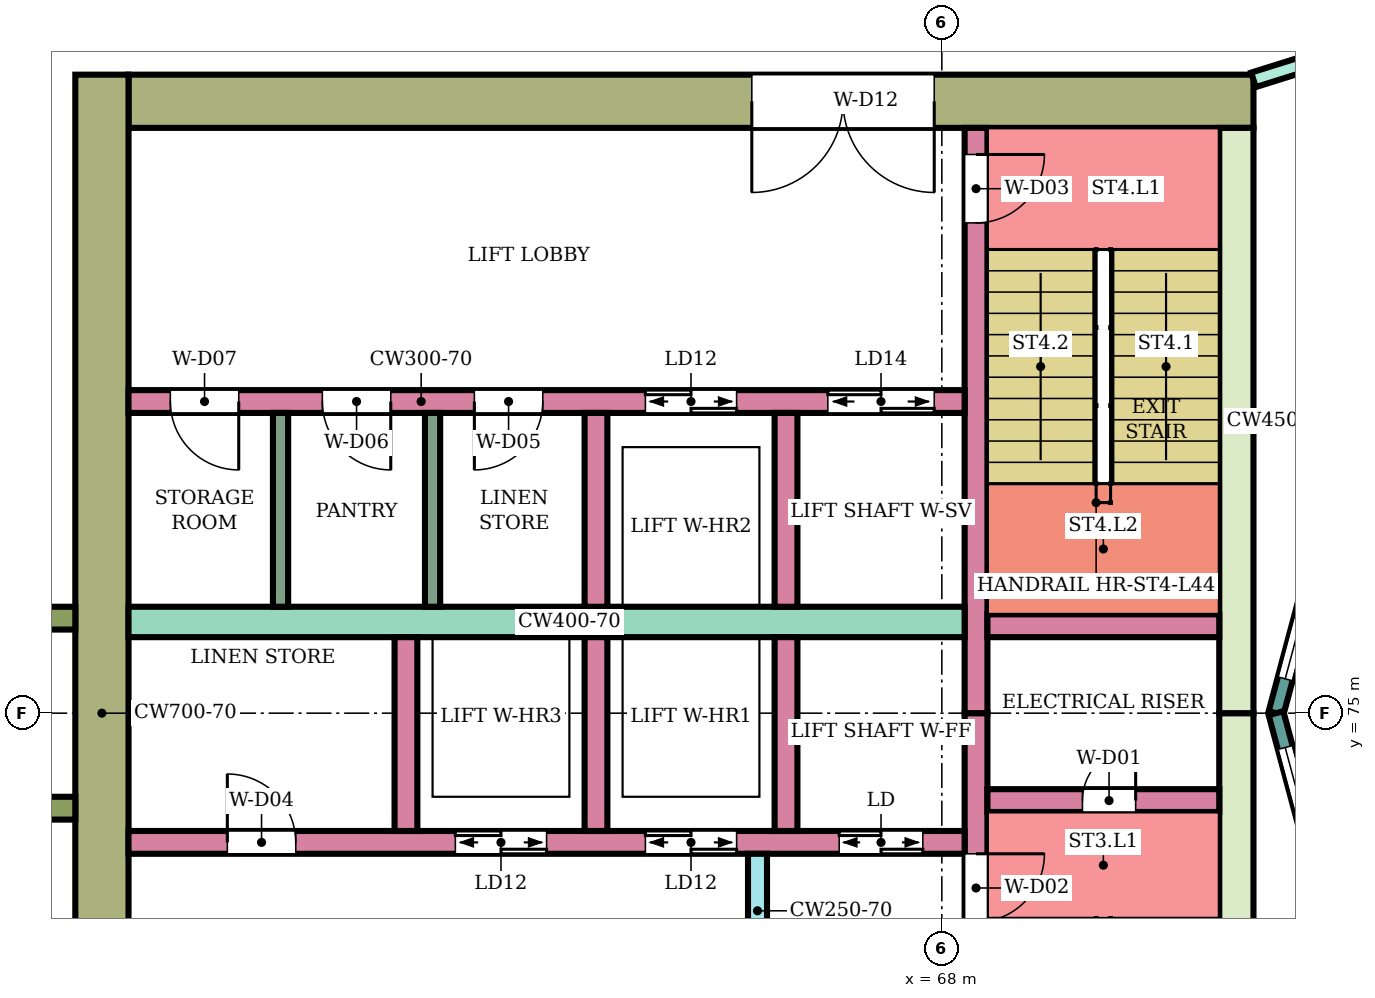
"""IFC4 building model, lengths in metres.
Left out: names, types, materials, properties, quantities, classifications, styles, units other than length and angle.
Written with IfcOpenShell. Run it as: python <this file> out.ifc"""

import sys

from ifc_helpers import new_model, si_unit, direction, frame, frame_2d, origin, place, context, subcontext, project, spatial, rectangle, extrude, element, fill, save


model = new_model("IFC4")
c1 = context("Model", 3, precision=1e-05, world=origin(), true_north=direction((0.0, 1.0)))
c2 = subcontext(c1, "Body", "Model", "MODEL_VIEW")
j1 = project(units=[si_unit("LENGTHUNIT", "METRE"), si_unit("PLANEANGLEUNIT", "RADIAN")], contexts=[c1])
p1 = place(None, origin())
s1 = spatial("IfcSite", under=j1, at=p1, CompositionType="ELEMENT")
p2 = place(p1, origin())
s2 = spatial("IfcBuilding", under=s1, at=p2, CompositionType="ELEMENT")
p3 = place(p2, frame((0.0, 0.0, 190.5)))
s3 = spatial("IfcBuildingStorey", under=s2, at=p3, CompositionType="ELEMENT", Elevation=190.5)
p4 = place(p3, frame((72.1, 83.05, 0.0), z_axis=(0.0, 0.0, 1.0), x_axis=(-1.0, 0.0, 0.0)))
e1 = element("IfcWall", 1, at=p4, inside=s3, PredefinedType="SHEAR", context=c2, shape_type="SweptSolid", body=[
    extrude(rectangle(XDim=14.8, YDim=0.7, at=frame_2d((7.4, 0.0))), origin(), (0.0, 0.0, 1.0), 3.78),
])
p5 = place(p4, frame((4.2, 0.0, 0.0)))
e2 = element("IfcOpeningElement", 2, at=p5, cuts=e1, PredefinedType="OPENING", context=c2, shape_type="SweptSolid", body=[
    extrude(rectangle(XDim=2.4, YDim=2.4, at=frame_2d((1.2, 1.2))), frame((0.0, 0.36, 0.0), z_axis=(0.0, -1.0, 0.0), x_axis=(1.0, 0.0, 0.0)), (0.0, 0.0, 1.0), 0.72),
])
for number, where, z_axis, x_axis in (
    (3, (71.875, 75.0, 0.0), (0.0, 0.0, 1.0), (0.0, -1.0, 0.0)),
    (4, (71.875, 82.7, 0.0), (0.0, 0.0, 1.0), (0.0, -1.0, 0.0)),
):
    element("IfcWall", number, at=place(p3, frame(where, z_axis=z_axis, x_axis=x_axis)), inside=s3, PredefinedType="SHEAR", context=c2, shape_type="SweptSolid", body=[
        extrude(rectangle(XDim=7.7, YDim=0.45, at=frame_2d((3.85, 0.0))), origin(), (0.0, 0.0, 1.0), 3.78),
    ])
p6 = place(p3, frame((56.95, 83.4, 0.0), z_axis=(0.0, 0.0, 1.0), x_axis=(0.0, -1.0, 0.0)))
e5 = element("IfcWall", 5, at=p6, inside=s3, PredefinedType="SHEAR", context=c2, shape_type="SweptSolid", body=[
    extrude(rectangle(XDim=16.8, YDim=0.7, at=frame_2d((8.4, 0.0))), origin(), (0.0, 0.0, 1.0), 3.78),
])
p7 = place(p3, frame((68.45, 75.0, 0.0), z_axis=(0.0, 0.0, 1.0), x_axis=(0.0, -1.0, 0.0)))
e6 = element("IfcWall", 6, at=p7, inside=s3, PredefinedType="SHEAR", context=c2, shape_type="SweptSolid", body=[
    extrude(rectangle(XDim=7.7, YDim=0.3, at=frame_2d((3.85, 0.0))), origin(), (0.0, 0.0, 1.0), 3.78),
])
p8 = place(p7, frame((1.85, 0.0, 0.0)))
e7 = element("IfcOpeningElement", 7, at=p8, cuts=e6, PredefinedType="OPENING", context=c2, shape_type="SweptSolid", body=[
    extrude(rectangle(XDim=0.9, YDim=2.1, at=frame_2d((0.45, 1.05))), frame((0.0, 0.16, 0.0), z_axis=(0.0, -1.0, 0.0), x_axis=(1.0, 0.0, 0.0)), (0.0, 0.0, 1.0), 0.32),
])
p9 = place(p3, frame((68.45, 82.7, 0.0), z_axis=(0.0, 0.0, 1.0), x_axis=(0.0, -1.0, 0.0)))
e8 = element("IfcWall", 8, at=p9, inside=s3, PredefinedType="SHEAR", context=c2, shape_type="SweptSolid", body=[
    extrude(rectangle(XDim=7.7, YDim=0.3, at=frame_2d((3.85, 0.0))), origin(), (0.0, 0.0, 1.0), 3.78),
])
p10 = place(p9, frame((0.35, 0.0, 0.0)))
e9 = element("IfcOpeningElement", 9, at=p10, cuts=e8, PredefinedType="OPENING", context=c2, shape_type="SweptSolid", body=[
    extrude(rectangle(XDim=0.9, YDim=2.1, at=frame_2d((0.45, 1.05))), frame((0.0, 0.16, 0.0), z_axis=(0.0, -1.0, 0.0), x_axis=(1.0, 0.0, 0.0)), (0.0, 0.0, 1.0), 0.32),
])
p11 = place(p3, frame((71.65, 73.85, 0.0), z_axis=(0.0, 0.0, 1.0), x_axis=(-1.0, 0.0, 0.0)))
e10 = element("IfcWall", 10, at=p11, inside=s3, PredefinedType="SHEAR", context=c2, shape_type="SweptSolid", body=[
    extrude(rectangle(XDim=3.05, YDim=0.3, at=frame_2d((1.525, 0.0))), origin(), (0.0, 0.0, 1.0), 3.78),
])
p12 = place(p11, frame((1.1, 0.0, 0.0)))
e11 = element("IfcOpeningElement", 11, at=p12, cuts=e10, PredefinedType="OPENING", context=c2, shape_type="SweptSolid", body=[
    extrude(rectangle(XDim=0.7, YDim=2.0, at=frame_2d((0.35, 1.0))), frame((0.0, 0.16, 0.0), z_axis=(0.0, -1.0, 0.0), x_axis=(1.0, 0.0, 0.0)), (0.0, 0.0, 1.0), 0.32),
])
p13 = place(p3, frame((71.65, 76.15, 0.0), z_axis=(0.0, 0.0, 1.0), x_axis=(-1.0, 0.0, 0.0)))
e12 = element("IfcWall", 12, at=p13, inside=s3, PredefinedType="SHEAR", context=c2, shape_type="SweptSolid", body=[
    extrude(rectangle(XDim=3.05, YDim=0.3, at=frame_2d((1.525, 0.0))), origin(), (0.0, 0.0, 1.0), 3.78),
])
p14 = place(p3, frame((68.3, 73.3, 0.0), z_axis=(0.0, 0.0, 1.0), x_axis=(-1.0, 0.0, 0.0)))
e13 = element("IfcWall", 13, at=p14, inside=s3, PredefinedType="SHEAR", context=c2, shape_type="SweptSolid", body=[
    extrude(rectangle(XDim=11.0, YDim=0.3, at=frame_2d((5.5, 0.0))), origin(), (0.0, 0.0, 1.0), 3.78),
])
p15 = place(p14, frame((0.55, 0.0, 0.0)))
e14 = element("IfcOpeningElement", 14, at=p15, cuts=e13, PredefinedType="OPENING", context=c2, shape_type="SweptSolid", body=[
    extrude(rectangle(XDim=1.1, YDim=2.1, at=frame_2d((0.55, 1.05))), frame((0.0, 0.16, 0.0), z_axis=(0.0, -1.0, 0.0), x_axis=(1.0, 0.0, 0.0)), (0.0, 0.0, 1.0), 0.32),
])
p16 = place(p14, frame((3.0, 0.0, 0.0)))
e15 = element("IfcOpeningElement", 15, at=p16, cuts=e13, PredefinedType="OPENING", context=c2, shape_type="SweptSolid", body=[
    extrude(rectangle(XDim=1.2, YDim=2.1, at=frame_2d((0.6, 1.05))), frame((0.0, 0.16, 0.0), z_axis=(0.0, -1.0, 0.0), x_axis=(1.0, 0.0, 0.0)), (0.0, 0.0, 1.0), 0.32),
])
p17 = place(p14, frame((5.5, 0.0, 0.0)))
e16 = element("IfcOpeningElement", 16, at=p17, cuts=e13, PredefinedType="OPENING", context=c2, shape_type="SweptSolid", body=[
    extrude(rectangle(XDim=1.2, YDim=2.1, at=frame_2d((0.6, 1.05))), frame((0.0, 0.16, 0.0), z_axis=(0.0, -1.0, 0.0), x_axis=(1.0, 0.0, 0.0)), (0.0, 0.0, 1.0), 0.32),
])
p18 = place(p14, frame((8.8, 0.0, 0.0)))
e17 = element("IfcOpeningElement", 17, at=p18, cuts=e13, PredefinedType="OPENING", context=c2, shape_type="SweptSolid", body=[
    extrude(rectangle(XDim=0.9, YDim=2.1, at=frame_2d((0.45, 1.05))), frame((0.0, 0.16, 0.0), z_axis=(0.0, -1.0, 0.0), x_axis=(1.0, 0.0, 0.0)), (0.0, 0.0, 1.0), 0.32),
])
p19 = place(p3, frame((68.3, 76.2, 0.0), z_axis=(0.0, 0.0, 1.0), x_axis=(-1.0, 0.0, 0.0)))
e18 = element("IfcWall", 18, at=p19, inside=s3, PredefinedType="SHEAR", context=c2, shape_type="SweptSolid", body=[
    extrude(rectangle(XDim=11.0, YDim=0.4, at=frame_2d((5.5, 0.0))), origin(), (0.0, 0.0, 1.0), 3.78),
])
p20 = place(p3, frame((68.3, 79.1, 0.0), z_axis=(0.0, 0.0, 1.0), x_axis=(-1.0, 0.0, 0.0)))
e19 = element("IfcWall", 19, at=p20, inside=s3, PredefinedType="SHEAR", context=c2, shape_type="SweptSolid", body=[
    extrude(rectangle(XDim=11.0, YDim=0.3, at=frame_2d((5.5, 0.0))), origin(), (0.0, 0.0, 1.0), 3.78),
])
p21 = place(p20, frame((0.4, 0.0, 0.0)))
e20 = element("IfcOpeningElement", 20, at=p21, cuts=e19, PredefinedType="OPENING", context=c2, shape_type="SweptSolid", body=[
    extrude(rectangle(XDim=1.4, YDim=2.1, at=frame_2d((0.7, 1.05))), frame((0.0, 0.16, 0.0), z_axis=(0.0, -1.0, 0.0), x_axis=(1.0, 0.0, 0.0)), (0.0, 0.0, 1.0), 0.32),
])
p22 = place(p20, frame((3.0, 0.0, 0.0)))
e21 = element("IfcOpeningElement", 21, at=p22, cuts=e19, PredefinedType="OPENING", context=c2, shape_type="SweptSolid", body=[
    extrude(rectangle(XDim=1.2, YDim=2.1, at=frame_2d((0.6, 1.05))), frame((0.0, 0.16, 0.0), z_axis=(0.0, -1.0, 0.0), x_axis=(1.0, 0.0, 0.0)), (0.0, 0.0, 1.0), 0.32),
])
p23 = place(p20, frame((5.55, 0.0, 0.0)))
e22 = element("IfcOpeningElement", 22, at=p23, cuts=e19, PredefinedType="OPENING", context=c2, shape_type="SweptSolid", body=[
    extrude(rectangle(XDim=0.9, YDim=2.1, at=frame_2d((0.45, 1.05))), frame((0.0, 0.16, 0.0), z_axis=(0.0, -1.0, 0.0), x_axis=(1.0, 0.0, 0.0)), (0.0, 0.0, 1.0), 0.32),
])
p24 = place(p20, frame((7.55, 0.0, 0.0)))
e23 = element("IfcOpeningElement", 23, at=p24, cuts=e19, PredefinedType="OPENING", context=c2, shape_type="SweptSolid", body=[
    extrude(rectangle(XDim=0.9, YDim=2.1, at=frame_2d((0.45, 1.05))), frame((0.0, 0.16, 0.0), z_axis=(0.0, -1.0, 0.0), x_axis=(1.0, 0.0, 0.0)), (0.0, 0.0, 1.0), 0.32),
])
p25 = place(p20, frame((9.55, 0.0, 0.0)))
e24 = element("IfcOpeningElement", 24, at=p25, cuts=e19, PredefinedType="OPENING", context=c2, shape_type="SweptSolid", body=[
    extrude(rectangle(XDim=0.9, YDim=2.1, at=frame_2d((0.45, 1.05))), frame((0.0, 0.16, 0.0), z_axis=(0.0, -1.0, 0.0), x_axis=(1.0, 0.0, 0.0)), (0.0, 0.0, 1.0), 0.32),
])
for number, where, z_axis, x_axis in (
    (25, (65.95, 76.0, 0.0), (0.0, 0.0, 1.0), (0.0, -1.0, 0.0)),
    (26, (63.45, 76.0, 0.0), (0.0, 0.0, 1.0), (0.0, -1.0, 0.0)),
    (27, (60.95, 76.0, 0.0), (0.0, 0.0, 1.0), (0.0, -1.0, 0.0)),
    (28, (65.95, 78.95, 0.0), (0.0, 0.0, 1.0), (0.0, -1.0, 0.0)),
    (29, (63.45, 78.95, 0.0), (0.0, 0.0, 1.0), (0.0, -1.0, 0.0)),
):
    element("IfcWall", number, at=place(p3, frame(where, z_axis=z_axis, x_axis=x_axis)), inside=s3, PredefinedType="SHEAR", context=c2, shape_type="SweptSolid", body=[
        extrude(rectangle(XDim=2.55, YDim=0.3, at=frame_2d((1.275, 0.0))), origin(), (0.0, 0.0, 1.0), 3.78),
    ])
p26 = place(p3, frame((65.575, 73.15, 0.0), z_axis=(0.0, 0.0, 1.0), x_axis=(0.0, -1.0, 0.0)))
e30 = element("IfcWall", 30, at=p26, inside=s3, PredefinedType="SHEAR", context=c2, shape_type="SweptSolid", body=[
    extrude(rectangle(XDim=1.5, YDim=0.25, at=frame_2d((0.75, 0.0))), origin(), (0.0, 0.0, 1.0), 3.78),
])
for number, where, z_axis, x_axis in (
    (31, (56.6, 76.25, 0.0), (0.0, 0.0, 1.0), (-1.0, 0.0, 0.0)),
    (32, (56.6, 73.75, 0.0), (0.0, 0.0, 1.0), (-1.0, 0.0, 0.0)),
):
    element("IfcWall", number, at=place(p3, frame(where, z_axis=z_axis, x_axis=x_axis)), inside=s3, PredefinedType="NOTDEFINED", context=c2, shape_type="SweptSolid", body=[
        extrude(rectangle(XDim=2.416, YDim=0.3, at=frame_2d((1.208, 0.0))), origin(), (0.0, 0.0, 1.0), 4.1),
    ])
p27 = place(p3, frame((73.415, 78.802, 0.0), z_axis=(0.0, 0.0, 1.0), x_axis=(-0.258789828301, -0.965933654434, 0.0)))
e33 = element("IfcWall", 33, at=p27, inside=s3, PredefinedType="NOTDEFINED", context=c2, shape_type="SweptSolid", body=[
    extrude(rectangle(XDim=3.936, YDim=0.2, at=frame_2d((1.968, 0.0))), origin(), (0.0, 0.0, 1.0), 4.1),
])
p28 = place(p27, frame((0.468, 0.0, 0.9)))
e34 = element("IfcOpeningElement", 34, at=p28, cuts=e33, PredefinedType="OPENING", context=c2, shape_type="SweptSolid", body=[
    extrude(rectangle(XDim=3.0, YDim=2.3, at=frame_2d((1.5, 1.15))), frame((0.0, 0.11, 0.0), z_axis=(0.0, -1.0, 0.0), x_axis=(1.0, 0.0, 0.0)), (0.0, 0.0, 1.0), 0.22),
])
p29 = place(p3, frame((72.396, 75.0, 0.0), z_axis=(0.0, 0.0, 1.0), x_axis=(0.258789828301, -0.965933654434, 0.0)))
e35 = element("IfcWall", 35, at=p29, inside=s3, PredefinedType="NOTDEFINED", context=c2, shape_type="SweptSolid", body=[
    extrude(rectangle(XDim=3.936, YDim=0.2, at=frame_2d((1.968, 0.0))), origin(), (0.0, 0.0, 1.0), 4.1),
])
p30 = place(p29, frame((0.468, 0.0, 0.9)))
e36 = element("IfcOpeningElement", 36, at=p30, cuts=e35, PredefinedType="OPENING", context=c2, shape_type="SweptSolid", body=[
    extrude(rectangle(XDim=3.0, YDim=2.3, at=frame_2d((1.5, 1.15))), frame((0.0, 0.11, 0.0), z_axis=(0.0, -1.0, 0.0), x_axis=(1.0, 0.0, 0.0)), (0.0, 0.0, 1.0), 0.22),
])
p31 = place(p3, frame((72.1, 83.332, 0.0), z_axis=(0.0, 0.0, 1.0), x_axis=(0.954233106619, 0.299063836383, 0.0)))
e37 = element("IfcWall", 37, at=p31, inside=s3, PredefinedType="PARTITIONING", context=c2, shape_type="SweptSolid", body=[
    extrude(rectangle(XDim=2.414, YDim=0.2, at=frame_2d((1.207, 0.0))), origin(), (0.0, 0.0, 1.0), 3.65),
])
p32 = place(p31, frame((0.762, 0.0, 0.0)))
e38 = element("IfcOpeningElement", 38, at=p32, cuts=e37, PredefinedType="OPENING", context=c2, shape_type="SweptSolid", body=[
    extrude(rectangle(XDim=0.9, YDim=2.1, at=frame_2d((0.45, 1.05))), frame((0.0, 0.11, 0.0), z_axis=(0.0, -1.0, 0.0), x_axis=(1.0, 0.0, 0.0)), (0.0, 0.0, 1.0), 0.22),
])
for number, where, z_axis, x_axis in (
    (39, (61.3, 78.95, 0.0), (0.0, 0.0, 1.0), (0.0, -1.0, 0.0)),
    (40, (59.3, 78.95, 0.0), (0.0, 0.0, 1.0), (0.0, -1.0, 0.0)),
):
    element("IfcWall", number, at=place(p3, frame(where, z_axis=z_axis, x_axis=x_axis)), inside=s3, PredefinedType="PARTITIONING", context=c2, shape_type="SweptSolid", body=[
        extrude(rectangle(XDim=2.55, YDim=0.2, at=frame_2d((1.275, 0.0))), origin(), (0.0, 0.0, 1.0), 3.78),
    ])
p33 = place(p28, origin())
e41 = element("IfcWindow", 41, at=p33, inside=s3, PartitioningType="SINGLE_PANEL", PredefinedType="WINDOW", context=c2, shape_type="SweptSolid", body=[
    extrude(rectangle(XDim=3.0, YDim=2.3, at=frame_2d((1.5, 1.15))), frame((0.0, 0.03, 0.0), z_axis=(0.0, -1.0, 0.0), x_axis=(1.0, 0.0, 0.0)), (0.0, 0.0, 1.0), 0.06),
])
fill(e34, e41)
p34 = place(p30, origin())
e42 = element("IfcWindow", 42, at=p34, inside=s3, PartitioningType="SINGLE_PANEL", PredefinedType="WINDOW", context=c2, shape_type="SweptSolid", body=[
    extrude(rectangle(XDim=3.0, YDim=2.3, at=frame_2d((1.5, 1.15))), frame((0.0, 0.03, 0.0), z_axis=(0.0, -1.0, 0.0), x_axis=(1.0, 0.0, 0.0)), (0.0, 0.0, 1.0), 0.06),
])
fill(e36, e42)
p35 = place(p12, frame((0.7, 0.0, 0.0), z_axis=(0.0, 0.0, 1.0), x_axis=(-1.0, 0.0, 0.0)))
e43 = element("IfcDoor", 43, at=p35, inside=s3, OperationType="SINGLE_SWING_RIGHT", PredefinedType="DOOR", context=c2, shape_type="SweptSolid", body=[
    extrude(rectangle(XDim=0.7, YDim=2.0, at=frame_2d((0.35, 1.0))), frame((0.0, 0.025, 0.0), z_axis=(0.0, -1.0, 0.0), x_axis=(1.0, 0.0, 0.0)), (0.0, 0.0, 1.0), 0.05),
])
fill(e11, e43)
p36 = place(p8, origin())
e44 = element("IfcDoor", 44, at=p36, inside=s3, OperationType="SINGLE_SWING_LEFT", PredefinedType="DOOR", context=c2, shape_type="SweptSolid", body=[
    extrude(rectangle(XDim=0.9, YDim=2.1, at=frame_2d((0.45, 1.05))), frame((0.0, 0.025, 0.0), z_axis=(0.0, -1.0, 0.0), x_axis=(1.0, 0.0, 0.0)), (0.0, 0.0, 1.0), 0.05),
])
fill(e7, e44)
p37 = place(p10, origin())
e45 = element("IfcDoor", 45, at=p37, inside=s3, OperationType="SINGLE_SWING_LEFT", PredefinedType="DOOR", context=c2, shape_type="SweptSolid", body=[
    extrude(rectangle(XDim=0.9, YDim=2.1, at=frame_2d((0.45, 1.05))), frame((0.0, 0.025, 0.0), z_axis=(0.0, -1.0, 0.0), x_axis=(1.0, 0.0, 0.0)), (0.0, 0.0, 1.0), 0.05),
])
fill(e9, e45)
p38 = place(p15, origin())
e46 = element("IfcDoor", 46, at=p38, inside=s3, OperationType="DOUBLE_DOOR_SLIDING", PredefinedType="DOOR", context=c2, shape_type="SweptSolid", body=[
    extrude(rectangle(XDim=1.1, YDim=2.1, at=frame_2d((0.55, 1.05))), frame((0.0, 0.025, 0.0), z_axis=(0.0, -1.0, 0.0), x_axis=(1.0, 0.0, 0.0)), (0.0, 0.0, 1.0), 0.05),
])
fill(e14, e46)
p39 = place(p16, origin())
e47 = element("IfcDoor", 47, at=p39, inside=s3, OperationType="DOUBLE_DOOR_SLIDING", PredefinedType="DOOR", context=c2, shape_type="SweptSolid", body=[
    extrude(rectangle(XDim=1.2, YDim=2.1, at=frame_2d((0.6, 1.05))), frame((0.0, 0.025, 0.0), z_axis=(0.0, -1.0, 0.0), x_axis=(1.0, 0.0, 0.0)), (0.0, 0.0, 1.0), 0.05),
])
fill(e15, e47)
p40 = place(p17, origin())
e48 = element("IfcDoor", 48, at=p40, inside=s3, OperationType="DOUBLE_DOOR_SLIDING", PredefinedType="DOOR", context=c2, shape_type="SweptSolid", body=[
    extrude(rectangle(XDim=1.2, YDim=2.1, at=frame_2d((0.6, 1.05))), frame((0.0, 0.025, 0.0), z_axis=(0.0, -1.0, 0.0), x_axis=(1.0, 0.0, 0.0)), (0.0, 0.0, 1.0), 0.05),
])
fill(e16, e48)
p41 = place(p18, frame((0.9, 0.0, 0.0), z_axis=(0.0, 0.0, 1.0), x_axis=(-1.0, 0.0, 0.0)))
e49 = element("IfcDoor", 49, at=p41, inside=s3, OperationType="SINGLE_SWING_LEFT", PredefinedType="DOOR", context=c2, shape_type="SweptSolid", body=[
    extrude(rectangle(XDim=0.9, YDim=2.1, at=frame_2d((0.45, 1.05))), frame((0.0, 0.025, 0.0), z_axis=(0.0, -1.0, 0.0), x_axis=(1.0, 0.0, 0.0)), (0.0, 0.0, 1.0), 0.05),
])
fill(e17, e49)
p42 = place(p21, origin())
e50 = element("IfcDoor", 50, at=p42, inside=s3, OperationType="DOUBLE_DOOR_SLIDING", PredefinedType="DOOR", context=c2, shape_type="SweptSolid", body=[
    extrude(rectangle(XDim=1.4, YDim=2.1, at=frame_2d((0.7, 1.05))), frame((0.0, 0.025, 0.0), z_axis=(0.0, -1.0, 0.0), x_axis=(1.0, 0.0, 0.0)), (0.0, 0.0, 1.0), 0.05),
])
fill(e20, e50)
p43 = place(p22, origin())
e51 = element("IfcDoor", 51, at=p43, inside=s3, OperationType="DOUBLE_DOOR_SLIDING", PredefinedType="DOOR", context=c2, shape_type="SweptSolid", body=[
    extrude(rectangle(XDim=1.2, YDim=2.1, at=frame_2d((0.6, 1.05))), frame((0.0, 0.025, 0.0), z_axis=(0.0, -1.0, 0.0), x_axis=(1.0, 0.0, 0.0)), (0.0, 0.0, 1.0), 0.05),
])
fill(e21, e51)
p44 = place(p23, origin())
e52 = element("IfcDoor", 52, at=p44, inside=s3, OperationType="SINGLE_SWING_RIGHT", PredefinedType="DOOR", context=c2, shape_type="SweptSolid", body=[
    extrude(rectangle(XDim=0.9, YDim=2.1, at=frame_2d((0.45, 1.05))), frame((0.0, 0.025, 0.0), z_axis=(0.0, -1.0, 0.0), x_axis=(1.0, 0.0, 0.0)), (0.0, 0.0, 1.0), 0.05),
])
fill(e22, e52)
p45 = place(p24, origin())
e53 = element("IfcDoor", 53, at=p45, inside=s3, OperationType="SINGLE_SWING_LEFT", PredefinedType="DOOR", context=c2, shape_type="SweptSolid", body=[
    extrude(rectangle(XDim=0.9, YDim=2.1, at=frame_2d((0.45, 1.05))), frame((0.0, 0.025, 0.0), z_axis=(0.0, -1.0, 0.0), x_axis=(1.0, 0.0, 0.0)), (0.0, 0.0, 1.0), 0.05),
])
fill(e23, e53)
p46 = place(p25, origin())
e54 = element("IfcDoor", 54, at=p46, inside=s3, OperationType="SINGLE_SWING_LEFT", PredefinedType="DOOR", context=c2, shape_type="SweptSolid", body=[
    extrude(rectangle(XDim=0.9, YDim=2.1, at=frame_2d((0.45, 1.05))), frame((0.0, 0.025, 0.0), z_axis=(0.0, -1.0, 0.0), x_axis=(1.0, 0.0, 0.0)), (0.0, 0.0, 1.0), 0.05),
])
fill(e24, e54)
p47 = place(p5, origin())
e55 = element("IfcDoor", 55, at=p47, inside=s3, OperationType="DOUBLE_DOOR_SINGLE_SWING", PredefinedType="DOOR", context=c2, shape_type="SweptSolid", body=[
    extrude(rectangle(XDim=2.4, YDim=2.4, at=frame_2d((1.2, 1.2))), frame((0.0, 0.025, 0.0), z_axis=(0.0, -1.0, 0.0), x_axis=(1.0, 0.0, 0.0)), (0.0, 0.0, 1.0), 0.05),
])
fill(e2, e55)
save(model, sys.argv[1])
